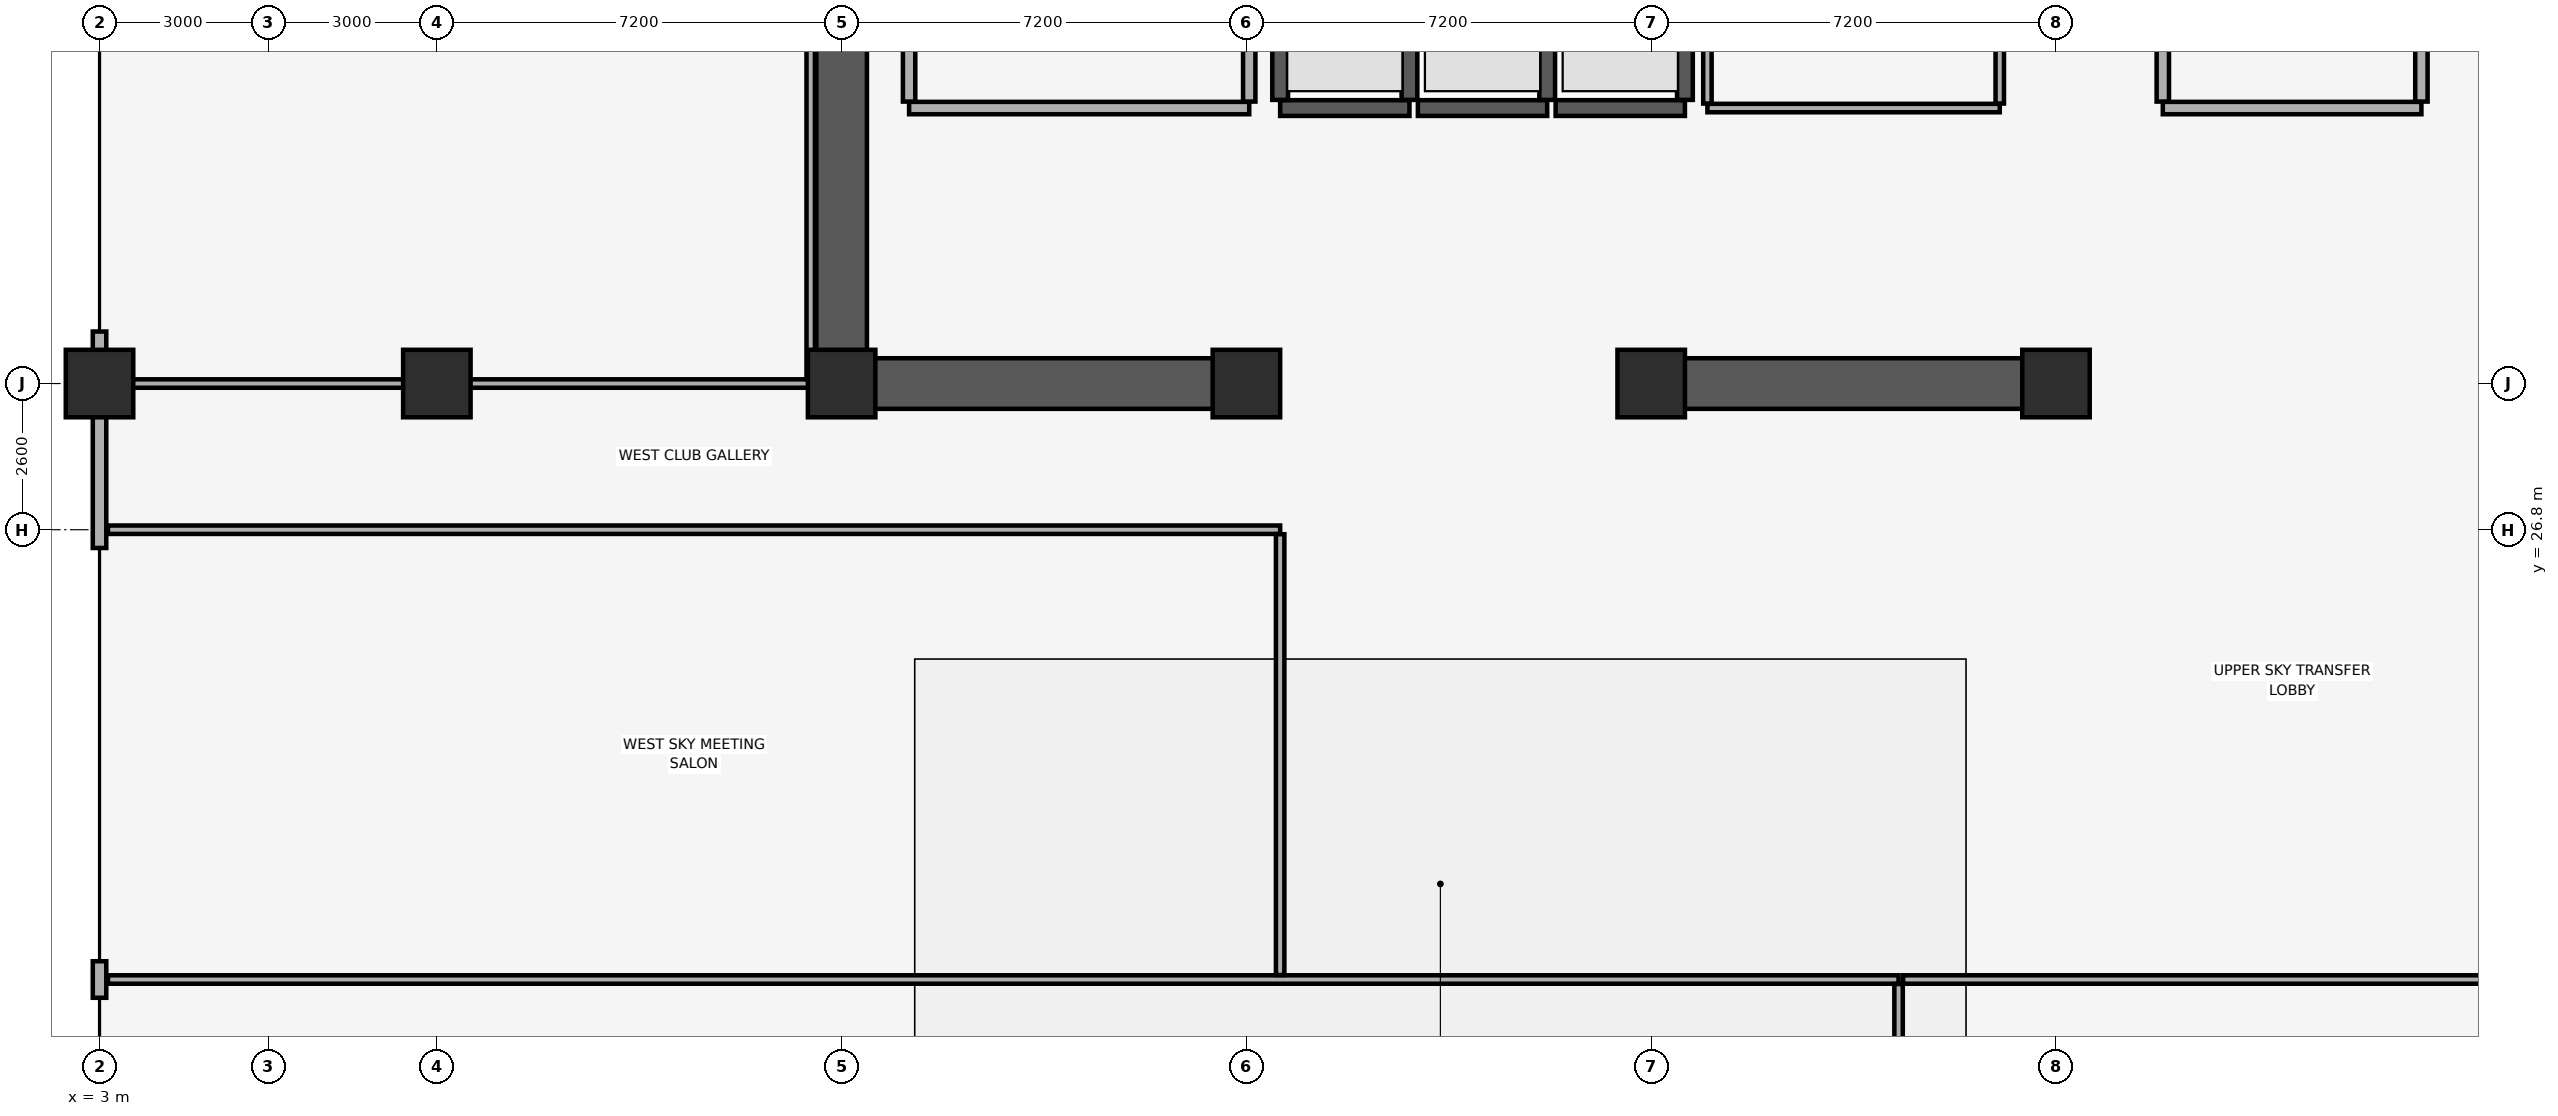
"""IFC4 building model, lengths in metres.
Left out: names, types, materials, properties, quantities, classifications, styles, units other than length and angle.
Written with IfcOpenShell. Run it as: python <this file> out.ifc"""

import sys

from ifc_helpers import new_model, si_unit, direction, frame, frame_2d, origin, origin_2d, place, context, subcontext, project, spatial, rectangle, extrude, element, fill, save


model = new_model("IFC4")
c1 = context("Model", 3, precision=1e-05, world=origin(), true_north=direction((0.0, 1.0)))
c2 = subcontext(c1, "Body", "Model", "MODEL_VIEW")
j1 = project(units=[si_unit("LENGTHUNIT", "METRE"), si_unit("PLANEANGLEUNIT", "RADIAN")], contexts=[c1])
p1 = place(None, origin())
s1 = spatial("IfcSite", under=j1, at=p1, CompositionType="ELEMENT")
p2 = place(p1, origin())
s2 = spatial("IfcBuilding", under=s1, at=p2, CompositionType="ELEMENT")
p3 = place(p2, frame((0.0, 0.0, 224.35)))
s3 = spatial("IfcBuildingStorey", under=s2, at=p3, CompositionType="ELEMENT", Elevation=224.35)
for number, where, z_axis, x_axis in (
    (1, (3.0, 29.4, 0.0), (0.0, 0.0, 1.0), (1.0, 0.0, 0.0)),
    (2, (9.0, 29.4, 0.0), (0.0, 0.0, 1.0), (1.0, 0.0, 0.0)),
    (3, (16.2, 29.4, 0.0), (0.0, 0.0, 1.0), (1.0, 0.0, 0.0)),
    (4, (23.4, 29.4, 0.0), (0.0, 0.0, 1.0), (1.0, 0.0, 0.0)),
    (5, (30.6, 29.4, 0.0), (0.0, 0.0, 1.0), (1.0, 0.0, 0.0)),
    (6, (37.8, 29.4, 0.0), (0.0, 0.0, 1.0), (1.0, 0.0, 0.0)),
):
    element("IfcColumn", number, at=place(p3, frame(where, z_axis=z_axis, x_axis=x_axis)), inside=s3, PredefinedType="COLUMN", context=c2, shape_type="SweptSolid", body=[
        extrude(rectangle(XDim=1.2, YDim=1.2, at=origin_2d()), origin(), (0.0, 0.0, 1.0), 4.56),
    ])
p4 = place(p3, frame((3.0, 30.325, 0.0), z_axis=(0.0, 0.0, 1.0), x_axis=(0.0, -1.0, 0.0)))
e7 = element("IfcWall", 7, at=p4, inside=s3, PredefinedType="SOLIDWALL", context=c2, shape_type="SweptSolid", body=[
    extrude(rectangle(XDim=3.85, YDim=0.24, at=frame_2d((1.925, 0.0))), origin(), (0.0, 0.0, 1.0), 4.52),
])
p5 = place(p3, frame((3.0, 19.125, 0.0), z_axis=(0.0, 0.0, 1.0), x_axis=(0.0, -1.0, 0.0)))
e8 = element("IfcWall", 8, at=p5, inside=s3, PredefinedType="SOLIDWALL", context=c2, shape_type="SweptSolid", body=[
    extrude(rectangle(XDim=0.65, YDim=0.24, at=frame_2d((0.325, 0.0))), origin(), (0.0, 0.0, 1.0), 4.52),
])
p6 = place(p3, frame((16.2, 29.4, 0.0), z_axis=(0.0, 0.0, 1.0), x_axis=(0.0, 1.0, 0.0)))
e9 = element("IfcWall", 9, at=p6, inside=s3, PredefinedType="SHEAR", context=c2, shape_type="SweptSolid", body=[
    extrude(rectangle(XDim=19.2, YDim=0.9, at=frame_2d((9.6, 0.0))), origin(), (0.0, 0.0, 1.0), 4.52),
])
p7 = place(p3, frame((16.655, 29.4, 0.0), z_axis=(0.0, 0.0, 1.0), x_axis=(1.0, 0.0, 0.0)))
e10 = element("IfcWall", 10, at=p7, inside=s3, PredefinedType="SHEAR", context=c2, shape_type="SweptSolid", body=[
    extrude(rectangle(XDim=6.945, YDim=0.9, at=frame_2d((3.473, 0.0))), origin(), (0.0, 0.0, 1.0), 4.52),
])
p8 = place(p3, frame((30.4, 29.4, 0.0), z_axis=(0.0, 0.0, 1.0), x_axis=(1.0, 0.0, 0.0)))
e11 = element("IfcWall", 11, at=p8, inside=s3, PredefinedType="SHEAR", context=c2, shape_type="SweptSolid", body=[
    extrude(rectangle(XDim=7.6, YDim=0.9, at=frame_2d((3.8, 0.0))), origin(), (0.0, 0.0, 1.0), 4.52),
])
p9 = place(p3, frame((24.0, 34.3, 0.0), z_axis=(0.0, 0.0, 1.0), x_axis=(1.0, 0.0, 0.0)))
e12 = element("IfcWall", 12, at=p9, inside=s3, PredefinedType="SHEAR", context=c2, shape_type="SweptSolid", body=[
    extrude(rectangle(XDim=2.3, YDim=0.28, at=frame_2d((1.15, 0.0))), origin(), (0.0, 0.0, 1.0), 4.52),
])
p10 = place(p9, frame((0.6, 0.0, 0.0)))
e13 = element("IfcOpeningElement", 13, at=p10, cuts=e12, PredefinedType="OPENING", context=c2, shape_type="SweptSolid", body=[
    extrude(rectangle(XDim=1.1, YDim=2.2, at=frame_2d((0.55, 1.1))), frame((0.0, 0.15, 0.0), z_axis=(0.0, -1.0, 0.0), x_axis=(1.0, 0.0, 0.0)), (0.0, 0.0, 1.0), 0.3),
])
for number, where, z_axis, x_axis in (
    (14, (24.0, 34.445, 0.0), (0.0, 0.0, 1.0), (0.0, 1.0, 0.0)),
    (15, (26.3, 34.445, 0.0), (0.0, 0.0, 1.0), (0.0, 1.0, 0.0)),
):
    element("IfcWall", number, at=place(p3, frame(where, z_axis=z_axis, x_axis=x_axis)), inside=s3, PredefinedType="SHEAR", context=c2, shape_type="SweptSolid", body=[
        extrude(rectangle(XDim=2.01, YDim=0.28, at=frame_2d((1.005, 0.0))), origin(), (0.0, 0.0, 1.0), 4.52),
    ])
p11 = place(p3, frame((26.45, 34.3, 0.0), z_axis=(0.0, 0.0, 1.0), x_axis=(1.0, 0.0, 0.0)))
e16 = element("IfcWall", 16, at=p11, inside=s3, PredefinedType="SHEAR", context=c2, shape_type="SweptSolid", body=[
    extrude(rectangle(XDim=2.3, YDim=0.28, at=frame_2d((1.15, 0.0))), origin(), (0.0, 0.0, 1.0), 4.52),
])
p12 = place(p11, frame((0.6, 0.0, 0.0)))
e17 = element("IfcOpeningElement", 17, at=p12, cuts=e16, PredefinedType="OPENING", context=c2, shape_type="SweptSolid", body=[
    extrude(rectangle(XDim=1.1, YDim=2.2, at=frame_2d((0.55, 1.1))), frame((0.0, 0.15, 0.0), z_axis=(0.0, -1.0, 0.0), x_axis=(1.0, 0.0, 0.0)), (0.0, 0.0, 1.0), 0.3),
])
p13 = place(p3, frame((28.75, 34.445, 0.0), z_axis=(0.0, 0.0, 1.0), x_axis=(0.0, 1.0, 0.0)))
e18 = element("IfcWall", 18, at=p13, inside=s3, PredefinedType="SHEAR", context=c2, shape_type="SweptSolid", body=[
    extrude(rectangle(XDim=2.01, YDim=0.28, at=frame_2d((1.005, 0.0))), origin(), (0.0, 0.0, 1.0), 4.52),
])
p14 = place(p3, frame((28.9, 34.3, 0.0), z_axis=(0.0, 0.0, 1.0), x_axis=(1.0, 0.0, 0.0)))
e19 = element("IfcWall", 19, at=p14, inside=s3, PredefinedType="SHEAR", context=c2, shape_type="SweptSolid", body=[
    extrude(rectangle(XDim=2.3, YDim=0.28, at=frame_2d((1.15, 0.0))), origin(), (0.0, 0.0, 1.0), 4.52),
])
p15 = place(p14, frame((0.6, 0.0, 0.0)))
e20 = element("IfcOpeningElement", 20, at=p15, cuts=e19, PredefinedType="OPENING", context=c2, shape_type="SweptSolid", body=[
    extrude(rectangle(XDim=1.1, YDim=2.2, at=frame_2d((0.55, 1.1))), frame((0.0, 0.15, 0.0), z_axis=(0.0, -1.0, 0.0), x_axis=(1.0, 0.0, 0.0)), (0.0, 0.0, 1.0), 0.3),
])
p16 = place(p3, frame((31.2, 34.445, 0.0), z_axis=(0.0, 0.0, 1.0), x_axis=(0.0, 1.0, 0.0)))
e21 = element("IfcWall", 21, at=p16, inside=s3, PredefinedType="SHEAR", context=c2, shape_type="SweptSolid", body=[
    extrude(rectangle(XDim=2.01, YDim=0.28, at=frame_2d((1.005, 0.0))), origin(), (0.0, 0.0, 1.0), 4.52),
])
p17 = place(p3, frame((17.4, 34.3, 0.0), z_axis=(0.0, 0.0, 1.0), x_axis=(1.0, 0.0, 0.0)))
e22 = element("IfcWall", 22, at=p17, inside=s3, PredefinedType="PARTITIONING", context=c2, shape_type="SweptSolid", body=[
    extrude(rectangle(XDim=6.05, YDim=0.22, at=frame_2d((3.025, 0.0))), origin(), (0.0, 0.0, 1.0), 4.52),
])
p18 = place(p17, frame((2.2, 0.0, 0.0)))
e23 = element("IfcOpeningElement", 23, at=p18, cuts=e22, PredefinedType="OPENING", context=c2, shape_type="SweptSolid", body=[
    extrude(rectangle(XDim=1.2, YDim=2.15, at=frame_2d((0.6, 1.075))), frame((0.0, 0.12, 0.0), z_axis=(0.0, -1.0, 0.0), x_axis=(1.0, 0.0, 0.0)), (0.0, 0.0, 1.0), 0.24),
])
p19 = place(p3, frame((17.4, 34.415, 0.0), z_axis=(0.0, 0.0, 1.0), x_axis=(0.0, 1.0, 0.0)))
e24 = element("IfcWall", 24, at=p19, inside=s3, PredefinedType="PARTITIONING", context=c2, shape_type="SweptSolid", body=[
    extrude(rectangle(XDim=5.43, YDim=0.22, at=frame_2d((2.715, 0.0))), origin(), (0.0, 0.0, 1.0), 4.52),
])
p20 = place(p3, frame((23.45, 34.415, 0.0), z_axis=(0.0, 0.0, 1.0), x_axis=(0.0, 1.0, 0.0)))
e25 = element("IfcWall", 25, at=p20, inside=s3, PredefinedType="PARTITIONING", context=c2, shape_type="SweptSolid", body=[
    extrude(rectangle(XDim=5.64, YDim=0.22, at=frame_2d((2.82, 0.0))), origin(), (0.0, 0.0, 1.0), 4.52),
])
p21 = place(p3, frame((39.7, 34.3, 0.0), z_axis=(0.0, 0.0, 1.0), x_axis=(1.0, 0.0, 0.0)))
e26 = element("IfcWall", 26, at=p21, inside=s3, PredefinedType="PARTITIONING", context=c2, shape_type="SweptSolid", body=[
    extrude(rectangle(XDim=4.6, YDim=0.22, at=frame_2d((2.3, 0.0))), origin(), (0.0, 0.0, 1.0), 4.52),
])
p22 = place(p21, frame((1.7, 0.0, 0.0)))
e27 = element("IfcOpeningElement", 27, at=p22, cuts=e26, PredefinedType="OPENING", context=c2, shape_type="SweptSolid", body=[
    extrude(rectangle(XDim=1.2, YDim=2.15, at=frame_2d((0.6, 1.075))), frame((0.0, 0.12, 0.0), z_axis=(0.0, -1.0, 0.0), x_axis=(1.0, 0.0, 0.0)), (0.0, 0.0, 1.0), 0.24),
])
for number, where, z_axis, x_axis in (
    (28, (39.7, 34.415, 0.0), (0.0, 0.0, 1.0), (0.0, 1.0, 0.0)),
    (29, (44.3, 34.415, 0.0), (0.0, 0.0, 1.0), (0.0, 1.0, 0.0)),
):
    element("IfcWall", number, at=place(p3, frame(where, z_axis=z_axis, x_axis=x_axis)), inside=s3, PredefinedType="PARTITIONING", context=c2, shape_type="SweptSolid", body=[
        extrude(rectangle(XDim=5.785, YDim=0.22, at=frame_2d((2.893, 0.0))), origin(), (0.0, 0.0, 1.0), 4.52),
    ])
p23 = place(p3, frame((31.6, 34.3, 0.0), z_axis=(0.0, 0.0, 1.0), x_axis=(1.0, 0.0, 0.0)))
e30 = element("IfcWall", 30, at=p23, inside=s3, PredefinedType="PARTITIONING", context=c2, shape_type="SweptSolid", body=[
    extrude(rectangle(XDim=5.2, YDim=0.15, at=frame_2d((2.6, 0.0))), origin(), (0.0, 0.0, 1.0), 4.52),
])
p24 = place(p23, frame((2.175, 0.0, 0.0)))
e31 = element("IfcOpeningElement", 31, at=p24, cuts=e30, PredefinedType="OPENING", context=c2, shape_type="SweptSolid", body=[
    extrude(rectangle(XDim=0.85, YDim=2.1, at=frame_2d((0.425, 1.05))), frame((0.0, 0.085, 0.0), z_axis=(0.0, -1.0, 0.0), x_axis=(1.0, 0.0, 0.0)), (0.0, 0.0, 1.0), 0.17),
])
for number, where, z_axis, x_axis in (
    (32, (31.6, 34.38, 0.0), (0.0, 0.0, 1.0), (0.0, 1.0, 0.0)),
    (33, (36.8, 34.38, 0.0), (0.0, 0.0, 1.0), (0.0, 1.0, 0.0)),
):
    element("IfcWall", number, at=place(p3, frame(where, z_axis=z_axis, x_axis=x_axis)), inside=s3, PredefinedType="PARTITIONING", context=c2, shape_type="SweptSolid", body=[
        extrude(rectangle(XDim=4.94, YDim=0.15, at=frame_2d((2.47, 0.0))), origin(), (0.0, 0.0, 1.0), 4.52),
    ])
p25 = place(p3, frame((3.15, 18.8, 0.0), z_axis=(0.0, 0.0, 1.0), x_axis=(1.0, 0.0, 0.0)))
e34 = element("IfcWall", 34, at=p25, inside=s3, PredefinedType="PARTITIONING", context=c2, shape_type="SweptSolid", body=[
    extrude(rectangle(XDim=31.85, YDim=0.15, at=frame_2d((15.925, 0.0))), origin(), (0.0, 0.0, 1.0), 4.52),
])
p26 = place(p25, frame((25.1, 0.0, 0.0)))
e35 = element("IfcOpeningElement", 35, at=p26, cuts=e34, PredefinedType="OPENING", context=c2, shape_type="SweptSolid", body=[
    extrude(rectangle(XDim=1.5, YDim=2.25, at=frame_2d((0.75, 1.125))), frame((0.0, 0.085, 0.0), z_axis=(0.0, -1.0, 0.0), x_axis=(1.0, 0.0, 0.0)), (0.0, 0.0, 1.0), 0.17),
])
p27 = place(p3, frame((35.0, 3.15, 0.0), z_axis=(0.0, 0.0, 1.0), x_axis=(0.0, 1.0, 0.0)))
e36 = element("IfcWall", 36, at=p27, inside=s3, PredefinedType="PARTITIONING", context=c2, shape_type="SweptSolid", body=[
    extrude(rectangle(XDim=15.57, YDim=0.15, at=frame_2d((7.785, 0.0))), origin(), (0.0, 0.0, 1.0), 4.52),
])
p28 = place(p3, frame((35.08, 18.8, 0.0), z_axis=(0.0, 0.0, 1.0), x_axis=(1.0, 0.0, 0.0)))
e37 = element("IfcWall", 37, at=p28, inside=s3, PredefinedType="PARTITIONING", context=c2, shape_type="SweptSolid", body=[
    extrude(rectangle(XDim=16.92, YDim=0.15, at=frame_2d((8.46, 0.0))), origin(), (0.0, 0.0, 1.0), 4.52),
])
p29 = place(p28, frame((6.17, 0.0, 0.0)))
e38 = element("IfcOpeningElement", 38, at=p29, cuts=e37, PredefinedType="OPENING", context=c2, shape_type="SweptSolid", body=[
    extrude(rectangle(XDim=1.5, YDim=2.25, at=frame_2d((0.75, 1.125))), frame((0.0, 0.085, 0.0), z_axis=(0.0, -1.0, 0.0), x_axis=(1.0, 0.0, 0.0)), (0.0, 0.0, 1.0), 0.17),
])
p30 = place(p3, frame((3.15, 26.8, 0.0), z_axis=(0.0, 0.0, 1.0), x_axis=(1.0, 0.0, 0.0)))
e39 = element("IfcWall", 39, at=p30, inside=s3, PredefinedType="PARTITIONING", context=c2, shape_type="SweptSolid", body=[
    extrude(rectangle(XDim=20.85, YDim=0.15, at=frame_2d((10.425, 0.0))), origin(), (0.0, 0.0, 1.0), 4.52),
])
p31 = place(p30, frame((15.35, 0.0, 0.0)))
e40 = element("IfcOpeningElement", 40, at=p31, cuts=e39, PredefinedType="OPENING", context=c2, shape_type="SweptSolid", body=[
    extrude(rectangle(XDim=1.0, YDim=2.15, at=frame_2d((0.5, 1.075))), frame((0.0, 0.085, 0.0), z_axis=(0.0, -1.0, 0.0), x_axis=(1.0, 0.0, 0.0)), (0.0, 0.0, 1.0), 0.17),
])
p32 = place(p3, frame((24.0, 18.88, 0.0), z_axis=(0.0, 0.0, 1.0), x_axis=(0.0, 1.0, 0.0)))
e41 = element("IfcWall", 41, at=p32, inside=s3, PredefinedType="PARTITIONING", context=c2, shape_type="SweptSolid", body=[
    extrude(rectangle(XDim=7.84, YDim=0.15, at=frame_2d((3.92, 0.0))), origin(), (0.0, 0.0, 1.0), 4.52),
])
p33 = place(p3, frame((3.15, 29.4, 0.0), z_axis=(0.0, 0.0, 1.0), x_axis=(1.0, 0.0, 0.0)))
e42 = element("IfcWall", 42, at=p33, inside=s3, PredefinedType="PARTITIONING", context=c2, shape_type="SweptSolid", body=[
    extrude(rectangle(XDim=12.5, YDim=0.15, at=frame_2d((6.25, 0.0))), origin(), (0.0, 0.0, 1.0), 3.4),
])
p34 = place(p33, frame((8.7, 0.0, 0.0)))
e43 = element("IfcOpeningElement", 43, at=p34, cuts=e42, PredefinedType="OPENING", context=c2, shape_type="SweptSolid", body=[
    extrude(rectangle(XDim=1.5, YDim=2.25, at=frame_2d((0.75, 1.125))), frame((0.0, 0.085, 0.0), z_axis=(0.0, -1.0, 0.0), x_axis=(1.0, 0.0, 0.0)), (0.0, 0.0, 1.0), 0.17),
])
p35 = place(p3, frame((15.65, 29.48, 0.0), z_axis=(0.0, 0.0, 1.0), x_axis=(0.0, 1.0, 0.0)))
e44 = element("IfcWall", 44, at=p35, inside=s3, PredefinedType="PARTITIONING", context=c2, shape_type="SweptSolid", body=[
    extrude(rectangle(XDim=19.37, YDim=0.15, at=frame_2d((9.685, 0.0))), origin(), (0.0, 0.0, 1.0), 4.52),
])
p36 = place(p10, origin())
e45 = element("IfcDoor", 45, at=p36, inside=s3, OperationType="DOUBLE_DOOR_SLIDING", PredefinedType="DOOR", context=c2, shape_type="SweptSolid", body=[
    extrude(rectangle(XDim=1.1, YDim=2.2, at=frame_2d((0.55, 1.1))), frame((0.0, 0.025, 0.0), z_axis=(0.0, -1.0, 0.0), x_axis=(1.0, 0.0, 0.0)), (0.0, 0.0, 1.0), 0.05),
])
fill(e13, e45)
p37 = place(p12, origin())
e46 = element("IfcDoor", 46, at=p37, inside=s3, OperationType="DOUBLE_DOOR_SLIDING", PredefinedType="DOOR", context=c2, shape_type="SweptSolid", body=[
    extrude(rectangle(XDim=1.1, YDim=2.2, at=frame_2d((0.55, 1.1))), frame((0.0, 0.025, 0.0), z_axis=(0.0, -1.0, 0.0), x_axis=(1.0, 0.0, 0.0)), (0.0, 0.0, 1.0), 0.05),
])
fill(e17, e46)
p38 = place(p15, origin())
e47 = element("IfcDoor", 47, at=p38, inside=s3, OperationType="DOUBLE_DOOR_SLIDING", PredefinedType="DOOR", context=c2, shape_type="SweptSolid", body=[
    extrude(rectangle(XDim=1.1, YDim=2.2, at=frame_2d((0.55, 1.1))), frame((0.0, 0.025, 0.0), z_axis=(0.0, -1.0, 0.0), x_axis=(1.0, 0.0, 0.0)), (0.0, 0.0, 1.0), 0.05),
])
fill(e20, e47)
p39 = place(p18, origin())
e48 = element("IfcDoor", 48, at=p39, inside=s3, OperationType="SINGLE_SWING_LEFT", PredefinedType="DOOR", context=c2, shape_type="SweptSolid", body=[
    extrude(rectangle(XDim=1.2, YDim=2.15, at=frame_2d((0.6, 1.075))), frame((0.0, 0.025, 0.0), z_axis=(0.0, -1.0, 0.0), x_axis=(1.0, 0.0, 0.0)), (0.0, 0.0, 1.0), 0.05),
])
fill(e23, e48)
p40 = place(p22, origin())
e49 = element("IfcDoor", 49, at=p40, inside=s3, OperationType="SINGLE_SWING_LEFT", PredefinedType="DOOR", context=c2, shape_type="SweptSolid", body=[
    extrude(rectangle(XDim=1.2, YDim=2.15, at=frame_2d((0.6, 1.075))), frame((0.0, 0.025, 0.0), z_axis=(0.0, -1.0, 0.0), x_axis=(1.0, 0.0, 0.0)), (0.0, 0.0, 1.0), 0.05),
])
fill(e27, e49)
p41 = place(p24, origin())
e50 = element("IfcDoor", 50, at=p41, inside=s3, OperationType="SINGLE_SWING_LEFT", PredefinedType="DOOR", context=c2, shape_type="SweptSolid", body=[
    extrude(rectangle(XDim=0.85, YDim=2.1, at=frame_2d((0.425, 1.05))), frame((0.0, 0.025, 0.0), z_axis=(0.0, -1.0, 0.0), x_axis=(1.0, 0.0, 0.0)), (0.0, 0.0, 1.0), 0.05),
])
fill(e31, e50)
p42 = place(p26, origin())
e51 = element("IfcDoor", 51, at=p42, inside=s3, OperationType="DOUBLE_DOOR_SINGLE_SWING", PredefinedType="DOOR", context=c2, shape_type="SweptSolid", body=[
    extrude(rectangle(XDim=1.5, YDim=2.25, at=frame_2d((0.75, 1.125))), frame((0.0, 0.025, 0.0), z_axis=(0.0, -1.0, 0.0), x_axis=(1.0, 0.0, 0.0)), (0.0, 0.0, 1.0), 0.05),
])
fill(e35, e51)
p43 = place(p29, origin())
e52 = element("IfcDoor", 52, at=p43, inside=s3, OperationType="DOUBLE_DOOR_SINGLE_SWING", PredefinedType="DOOR", context=c2, shape_type="SweptSolid", body=[
    extrude(rectangle(XDim=1.5, YDim=2.25, at=frame_2d((0.75, 1.125))), frame((0.0, 0.025, 0.0), z_axis=(0.0, -1.0, 0.0), x_axis=(1.0, 0.0, 0.0)), (0.0, 0.0, 1.0), 0.05),
])
fill(e38, e52)
p44 = place(p31, origin())
e53 = element("IfcDoor", 53, at=p44, inside=s3, OperationType="SINGLE_SWING_LEFT", PredefinedType="DOOR", context=c2, shape_type="SweptSolid", body=[
    extrude(rectangle(XDim=1.0, YDim=2.15, at=frame_2d((0.5, 1.075))), frame((0.0, 0.025, 0.0), z_axis=(0.0, -1.0, 0.0), x_axis=(1.0, 0.0, 0.0)), (0.0, 0.0, 1.0), 0.05),
])
fill(e40, e53)
p45 = place(p34, origin())
e54 = element("IfcDoor", 54, at=p45, inside=s3, OperationType="DOUBLE_DOOR_SINGLE_SWING", PredefinedType="DOOR", context=c2, shape_type="SweptSolid", body=[
    extrude(rectangle(XDim=1.5, YDim=2.25, at=frame_2d((0.75, 1.125))), frame((0.0, 0.025, 0.0), z_axis=(0.0, -1.0, 0.0), x_axis=(1.0, 0.0, 0.0)), (0.0, 0.0, 1.0), 0.05),
])
fill(e43, e54)
save(model, sys.argv[1])
